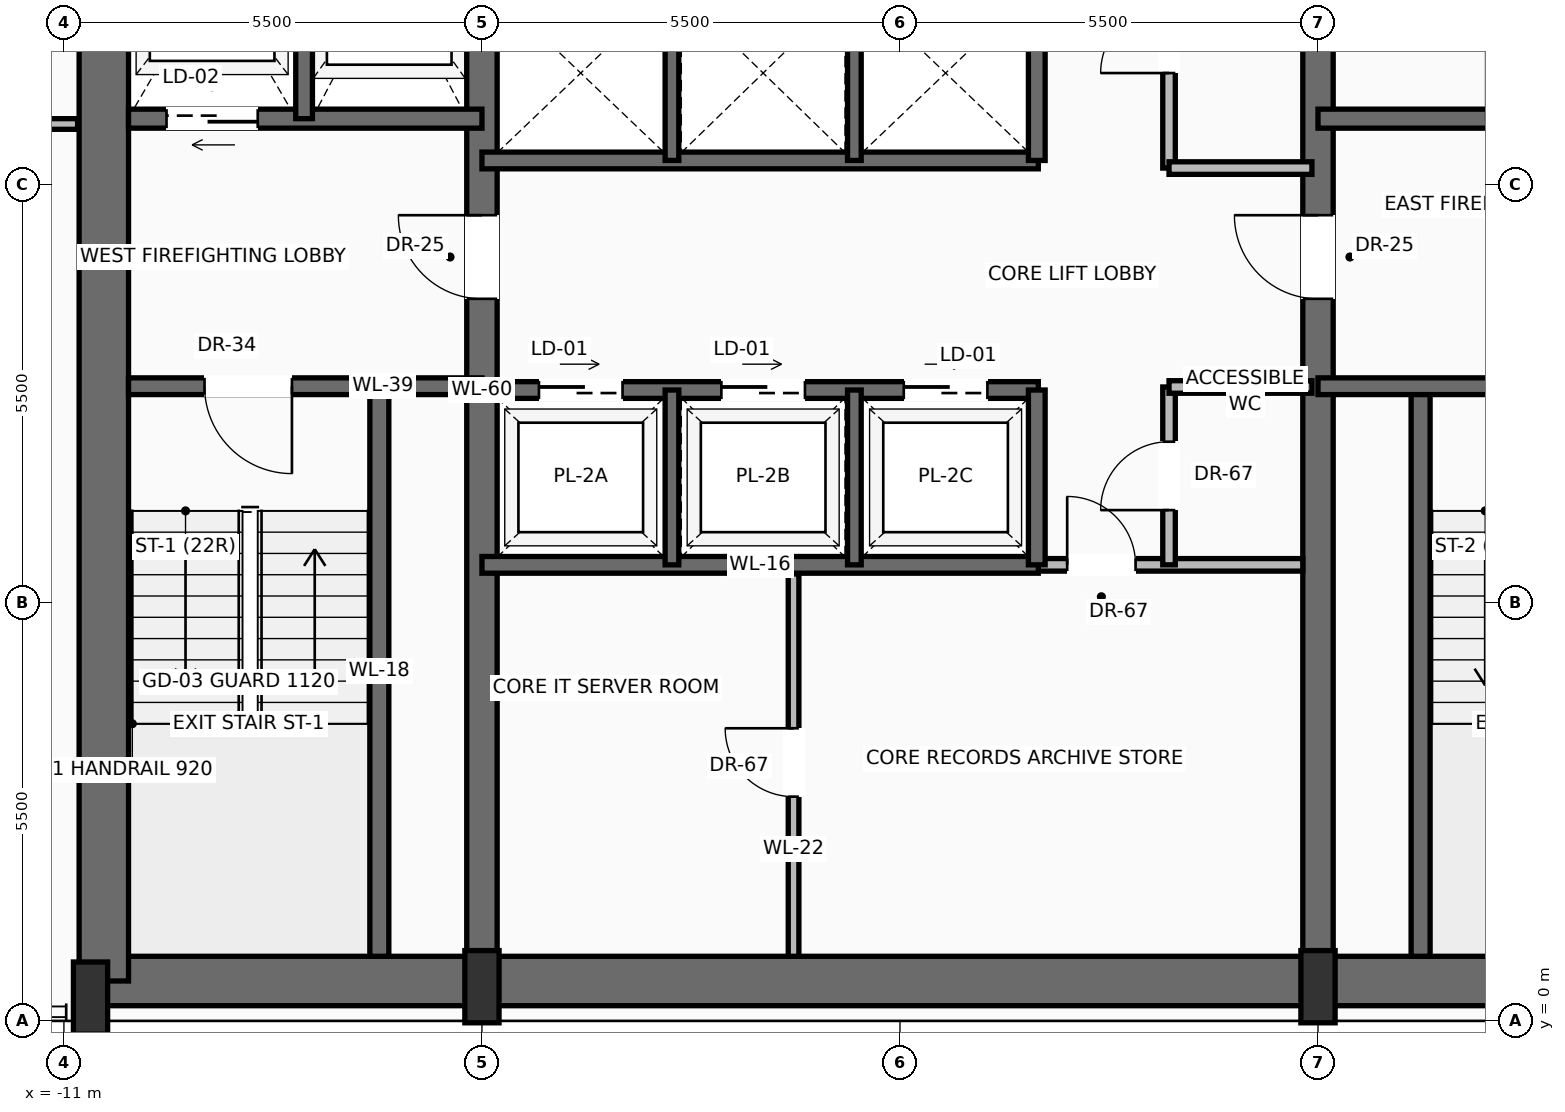
"""IFC4 building model, lengths in metres.
Left out: names, types, materials, properties, quantities, classifications, styles, units other than length and angle.
Written with IfcOpenShell. Run it as: python <this file> out.ifc"""

import sys

from ifc_helpers import new_model, si_unit, direction, frame, frame_2d, origin, origin_2d, place, context, subcontext, project, spatial, rectangle, extrude, source, transform, mapped, element, fill, save


model = new_model("IFC4")
c1 = context("Model", 3, precision=1e-05, world=origin(), true_north=direction((0.0, 1.0)))
c2 = subcontext(c1, "Body", "Model", "MODEL_VIEW")
j1 = project(units=[si_unit("LENGTHUNIT", "METRE"), si_unit("PLANEANGLEUNIT", "RADIAN")], contexts=[c1])
p1 = place(None, origin())
s1 = spatial("IfcSite", under=j1, at=p1, CompositionType="ELEMENT")
p2 = place(p1, origin())
s2 = spatial("IfcBuilding", under=s1, at=p2, CompositionType="ELEMENT")
p3 = place(p2, frame((0.0, 0.0, 136.7)))
s3 = spatial("IfcBuildingStorey", under=s2, at=p3, CompositionType="ELEMENT", Elevation=136.7)
p4 = place(p3, frame((-10.65, 0.525, 0.0), z_axis=(0.0, 0.0, 1.0), x_axis=(1.0, 0.0, 0.0)))
e1 = element("IfcWall", 1, at=p4, inside=s3, PredefinedType="SHEAR", context=c2, shape_type="SweptSolid", body=[
    extrude(rectangle(XDim=21.3, YDim=0.65, at=frame_2d((10.65, 0.0))), origin(), (0.0, 0.0, 1.0), 3.47),
])
p5 = place(p3, frame((-10.475, 0.525, 0.0), z_axis=(0.0, 0.0, 1.0), x_axis=(0.0, 1.0, 0.0)))
e2 = element("IfcWall", 2, at=p5, inside=s3, PredefinedType="SHEAR", context=c2, shape_type="SweptSolid", body=[
    extrude(rectangle(XDim=15.55, YDim=0.65, at=frame_2d((7.775, 0.0))), origin(), (0.0, 0.0, 1.0), 3.47),
])
p6 = place(p3, frame((-5.5, 0.525, 0.0), z_axis=(0.0, 0.0, 1.0), x_axis=(0.0, 1.0, 0.0)))
e3 = element("IfcWall", 3, at=p6, inside=s3, PredefinedType="SHEAR", context=c2, shape_type="SweptSolid", body=[
    extrude(rectangle(XDim=15.55, YDim=0.4, at=frame_2d((7.775, 0.0))), origin(), (0.0, 0.0, 1.0), 3.47),
])
p7 = place(p6, frame((8.975, 0.0, 0.0)))
e4 = element("IfcOpeningElement", 4, at=p7, cuts=e3, PredefinedType="OPENING", context=c2, shape_type="SweptSolid", body=[
    extrude(rectangle(XDim=1.1, YDim=2.2, at=frame_2d((0.55, 1.1))), frame((0.0, 0.21, 0.0), z_axis=(0.0, -1.0, 0.0), x_axis=(1.0, 0.0, 0.0)), (0.0, 0.0, 1.0), 0.42),
])
p8 = place(p3, frame((5.5, 0.525, 0.0), z_axis=(0.0, 0.0, 1.0), x_axis=(0.0, 1.0, 0.0)))
e5 = element("IfcWall", 5, at=p8, inside=s3, PredefinedType="SHEAR", context=c2, shape_type="SweptSolid", body=[
    extrude(rectangle(XDim=15.55, YDim=0.4, at=frame_2d((7.775, 0.0))), origin(), (0.0, 0.0, 1.0), 3.47),
])
p9 = place(p8, frame((8.975, 0.0, 0.0)))
e6 = element("IfcOpeningElement", 6, at=p9, cuts=e5, PredefinedType="OPENING", context=c2, shape_type="SweptSolid", body=[
    extrude(rectangle(XDim=1.1, YDim=2.2, at=frame_2d((0.55, 1.1))), frame((0.0, 0.21, 0.0), z_axis=(0.0, -1.0, 0.0), x_axis=(1.0, 0.0, 0.0)), (0.0, 0.0, 1.0), 0.42),
])
m1 = source(origin(), c2, "Body", "SweptSolid", [
    extrude(rectangle(XDim=0.45, YDim=0.95, at=origin_2d()), origin(), (0.0, 0.0, 1.0), 3.7),
])
for number, where, z_axis, x_axis in (
    (7, (-10.65, 0.3, 0.0), (0.0, 0.0, 1.0), (1.0, 0.0, 0.0)),
    (8, (-5.5, 0.45, 0.0), (0.0, 0.0, 1.0), (1.0, 0.0, 0.0)),
    (9, (5.5, 0.45, 0.0), (0.0, 0.0, 1.0), (1.0, 0.0, 0.0)),
):
    element("IfcColumn", number, at=place(p3, frame(where, z_axis=z_axis, x_axis=x_axis)), inside=s3, PredefinedType="PILASTER", context=c2, shape_type="MappedRepresentation", body=[
        mapped(m1, transform((0.0, 0.0, 0.0), scale=1.0)),
    ])
p10 = place(p3, frame((-6.85, 0.85, 0.0), z_axis=(0.0, 0.0, 1.0), x_axis=(0.0, 1.0, 0.0)))
e10 = element("IfcWall", 10, at=p10, inside=s3, PredefinedType="SOLIDWALL", context=c2, shape_type="SweptSolid", body=[
    extrude(rectangle(XDim=7.5, YDim=0.25, at=frame_2d((3.75, 0.0))), origin(), (0.0, 0.0, 1.0), 3.47),
])
p11 = place(p3, frame((-5.5, 8.35, 0.0), z_axis=(0.0, 0.0, 1.0), x_axis=(-1.0, 0.0, 0.0)))
e11 = element("IfcWall", 11, at=p11, inside=s3, PredefinedType="SOLIDWALL", context=c2, shape_type="SweptSolid", body=[
    extrude(rectangle(XDim=4.65, YDim=0.22, at=frame_2d((2.325, 0.0))), origin(), (0.0, 0.0, 1.0), 3.47),
])
p12 = place(p11, frame((2.5, 0.0, 0.0)))
e12 = element("IfcOpeningElement", 12, at=p12, cuts=e11, PredefinedType="OPENING", context=c2, shape_type="SweptSolid", body=[
    extrude(rectangle(XDim=1.15, YDim=2.2, at=frame_2d((0.575, 1.1))), frame((0.0, 0.12, 0.0), z_axis=(0.0, -1.0, 0.0), x_axis=(1.0, 0.0, 0.0)), (0.0, 0.0, 1.0), 0.24),
])
p13 = place(p3, frame((-5.5, 11.87, 0.0), z_axis=(0.0, 0.0, 1.0), x_axis=(-1.0, 0.0, 0.0)))
e13 = element("IfcWall", 13, at=p13, inside=s3, PredefinedType="SOLIDWALL", context=c2, shape_type="SweptSolid", body=[
    extrude(rectangle(XDim=4.65, YDim=0.25, at=frame_2d((2.325, 0.0))), origin(), (0.0, 0.0, 1.0), 3.47),
])
p14 = place(p13, frame((2.95, 0.0, 0.0)))
e14 = element("IfcOpeningElement", 14, at=p14, cuts=e13, PredefinedType="OPENING", context=c2, shape_type="SweptSolid", body=[
    extrude(rectangle(XDim=1.2, YDim=2.25, at=frame_2d((0.6, 1.125))), frame((0.0, 0.135, 0.0), z_axis=(0.0, -1.0, 0.0), x_axis=(1.0, 0.0, 0.0)), (0.0, 0.0, 1.0), 0.27),
])
p15 = place(p3, frame((-7.84, 11.87, 0.0), z_axis=(0.0, 0.0, 1.0), x_axis=(0.0, 1.0, 0.0)))
e15 = element("IfcWall", 15, at=p15, inside=s3, PredefinedType="SOLIDWALL", context=c2, shape_type="SweptSolid", body=[
    extrude(rectangle(XDim=3.88, YDim=0.22, at=frame_2d((1.94, 0.0))), origin(), (0.0, 0.0, 1.0), 3.47),
])
p16 = place(p3, frame((6.85, 0.85, 0.0), z_axis=(0.0, 0.0, 1.0), x_axis=(0.0, 1.0, 0.0)))
e16 = element("IfcWall", 16, at=p16, inside=s3, PredefinedType="SOLIDWALL", context=c2, shape_type="SweptSolid", body=[
    extrude(rectangle(XDim=7.5, YDim=0.25, at=frame_2d((3.75, 0.0))), origin(), (0.0, 0.0, 1.0), 3.47),
])
p17 = place(p3, frame((10.15, 8.35, 0.0), z_axis=(0.0, 0.0, 1.0), x_axis=(-1.0, 0.0, 0.0)))
e17 = element("IfcWall", 17, at=p17, inside=s3, PredefinedType="SOLIDWALL", context=c2, shape_type="SweptSolid", body=[
    extrude(rectangle(XDim=4.65, YDim=0.22, at=frame_2d((2.325, 0.0))), origin(), (0.0, 0.0, 1.0), 3.47),
])
p18 = place(p17, frame((1.0, 0.0, 0.0)))
e18 = element("IfcOpeningElement", 18, at=p18, cuts=e17, PredefinedType="OPENING", context=c2, shape_type="SweptSolid", body=[
    extrude(rectangle(XDim=1.15, YDim=2.2, at=frame_2d((0.575, 1.1))), frame((0.0, 0.12, 0.0), z_axis=(0.0, -1.0, 0.0), x_axis=(1.0, 0.0, 0.0)), (0.0, 0.0, 1.0), 0.24),
])
p19 = place(p3, frame((10.15, 11.87, 0.0), z_axis=(0.0, 0.0, 1.0), x_axis=(-1.0, 0.0, 0.0)))
e19 = element("IfcWall", 19, at=p19, inside=s3, PredefinedType="SOLIDWALL", context=c2, shape_type="SweptSolid", body=[
    extrude(rectangle(XDim=4.65, YDim=0.25, at=frame_2d((2.325, 0.0))), origin(), (0.0, 0.0, 1.0), 3.47),
])
p20 = place(p19, frame((0.5, 0.0, 0.0)))
e20 = element("IfcOpeningElement", 20, at=p20, cuts=e19, PredefinedType="OPENING", context=c2, shape_type="SweptSolid", body=[
    extrude(rectangle(XDim=1.2, YDim=2.25, at=frame_2d((0.6, 1.125))), frame((0.0, 0.135, 0.0), z_axis=(0.0, -1.0, 0.0), x_axis=(1.0, 0.0, 0.0)), (0.0, 0.0, 1.0), 0.27),
])
p21 = place(p3, frame((1.82, 6.0, 0.0), z_axis=(0.0, 0.0, 1.0), x_axis=(1.0, 0.0, 0.0)))
e21 = element("IfcWall", 21, at=p21, inside=s3, PredefinedType="PARTITIONING", context=c2, shape_type="SweptSolid", body=[
    extrude(rectangle(XDim=3.48, YDim=0.165, at=frame_2d((1.74, 0.0))), origin(), (0.0, 0.0, 1.0), 3.462),
])
p22 = place(p21, frame((0.38, 0.0, 0.0)))
e22 = element("IfcOpeningElement", 22, at=p22, cuts=e21, PredefinedType="OPENING", context=c2, shape_type="SweptSolid", body=[
    extrude(rectangle(XDim=0.9, YDim=2.1, at=frame_2d((0.45, 1.05))), frame((0.0, 0.093, 0.0), z_axis=(0.0, -1.0, 0.0), x_axis=(1.0, 0.0, 0.0)), (0.0, 0.0, 1.0), 0.185),
])
p23 = place(p3, frame((-1.4, 0.85, 0.0), z_axis=(0.0, 0.0, 1.0), x_axis=(0.0, 1.0, 0.0)))
e23 = element("IfcWall", 23, at=p23, inside=s3, PredefinedType="PARTITIONING", context=c2, shape_type="SweptSolid", body=[
    extrude(rectangle(XDim=5.03, YDim=0.14, at=frame_2d((2.515, 0.0))), origin(), (0.0, 0.0, 1.0), 3.462),
])
p24 = place(p23, frame((2.1, 0.0, 0.0)))
e24 = element("IfcOpeningElement", 24, at=p24, cuts=e23, PredefinedType="OPENING", context=c2, shape_type="SweptSolid", body=[
    extrude(rectangle(XDim=0.9, YDim=2.1, at=frame_2d((0.45, 1.05))), frame((0.0, 0.08, 0.0), z_axis=(0.0, -1.0, 0.0), x_axis=(1.0, 0.0, 0.0)), (0.0, 0.0, 1.0), 0.16),
])
p25 = place(p3, frame((3.54, 6.0, 0.0), z_axis=(0.0, 0.0, 1.0), x_axis=(0.0, 1.0, 0.0)))
e25 = element("IfcWall", 25, at=p25, inside=s3, PredefinedType="PARTITIONING", context=c2, shape_type="SweptSolid", body=[
    extrude(rectangle(XDim=2.34, YDim=0.165, at=frame_2d((1.17, 0.0))), origin(), (0.0, 0.0, 1.0), 3.462),
])
p26 = place(p25, frame((0.72, 0.0, 0.0)))
e26 = element("IfcOpeningElement", 26, at=p26, cuts=e25, PredefinedType="OPENING", context=c2, shape_type="SweptSolid", body=[
    extrude(rectangle(XDim=0.9, YDim=2.1, at=frame_2d((0.45, 1.05))), frame((0.0, 0.093, 0.0), z_axis=(0.0, -1.0, 0.0), x_axis=(1.0, 0.0, 0.0)), (0.0, 0.0, 1.0), 0.185),
])
p27 = place(p3, frame((3.54, 8.34, 0.0), z_axis=(0.0, 0.0, 1.0), x_axis=(1.0, 0.0, 0.0)))
e27 = element("IfcWall", 27, at=p27, inside=s3, PredefinedType="PARTITIONING", context=c2, shape_type="SweptSolid", body=[
    extrude(rectangle(XDim=1.88, YDim=0.165, at=frame_2d((0.94, 0.0))), origin(), (0.0, 0.0, 1.0), 3.462),
])
p28 = place(p3, frame((-5.5, 6.0, 0.0), z_axis=(0.0, 0.0, 1.0), x_axis=(1.0, 0.0, 0.0)))
e28 = element("IfcWall", 28, at=p28, inside=s3, PredefinedType="SOLIDWALL", context=c2, shape_type="SweptSolid", body=[
    extrude(rectangle(XDim=7.32, YDim=0.22, at=frame_2d((3.66, 0.0))), origin(), (0.0, 0.0, 1.0), 3.47),
])
p29 = place(p3, frame((-5.5, 8.3, 0.0), z_axis=(0.0, 0.0, 1.0), x_axis=(1.0, 0.0, 0.0)))
e29 = element("IfcWall", 29, at=p29, inside=s3, PredefinedType="SOLIDWALL", context=c2, shape_type="SweptSolid", body=[
    extrude(rectangle(XDim=7.32, YDim=0.22, at=frame_2d((3.66, 0.0))), origin(), (0.0, 0.0, 1.0), 3.47),
])
p30 = place(p29, frame((0.75, 0.0, 0.0)))
e30 = element("IfcOpeningElement", 30, at=p30, cuts=e29, PredefinedType="OPENING", context=c2, shape_type="SweptSolid", body=[
    extrude(rectangle(XDim=1.1, YDim=2.2, at=frame_2d((0.55, 1.1))), frame((0.0, 0.12, 0.0), z_axis=(0.0, -1.0, 0.0), x_axis=(1.0, 0.0, 0.0)), (0.0, 0.0, 1.0), 0.24),
])
p31 = place(p29, frame((3.15, 0.0, 0.0)))
e31 = element("IfcOpeningElement", 31, at=p31, cuts=e29, PredefinedType="OPENING", context=c2, shape_type="SweptSolid", body=[
    extrude(rectangle(XDim=1.1, YDim=2.2, at=frame_2d((0.55, 1.1))), frame((0.0, 0.12, 0.0), z_axis=(0.0, -1.0, 0.0), x_axis=(1.0, 0.0, 0.0)), (0.0, 0.0, 1.0), 0.24),
])
p32 = place(p29, frame((5.55, 0.0, 0.0)))
e32 = element("IfcOpeningElement", 32, at=p32, cuts=e29, PredefinedType="OPENING", context=c2, shape_type="SweptSolid", body=[
    extrude(rectangle(XDim=1.1, YDim=2.2, at=frame_2d((0.55, 1.1))), frame((0.0, 0.12, 0.0), z_axis=(0.0, -1.0, 0.0), x_axis=(1.0, 0.0, 0.0)), (0.0, 0.0, 1.0), 0.24),
])
p33 = place(p3, frame((1.8, 6.0, 0.0), z_axis=(0.0, 0.0, 1.0), x_axis=(0.0, 1.0, 0.0)))
e33 = element("IfcWall", 33, at=p33, inside=s3, PredefinedType="SOLIDWALL", context=c2, shape_type="SweptSolid", body=[
    extrude(rectangle(XDim=2.3, YDim=0.22, at=frame_2d((1.15, 0.0))), origin(), (0.0, 0.0, 1.0), 3.47),
])
for number, where, z_axis, x_axis in (
    (34, (-3.0, 6.0, 0.0), (0.0, 0.0, 1.0), (0.0, 1.0, 0.0)),
    (35, (-0.6, 6.0, 0.0), (0.0, 0.0, 1.0), (0.0, 1.0, 0.0)),
):
    element("IfcWall", number, at=place(p3, frame(where, z_axis=z_axis, x_axis=x_axis)), inside=s3, PredefinedType="SOLIDWALL", context=c2, shape_type="SweptSolid", body=[
        extrude(rectangle(XDim=2.3, YDim=0.18, at=frame_2d((1.15, 0.0))), origin(), (0.0, 0.0, 1.0), 3.47),
    ])
p34 = place(p3, frame((-5.5, 11.32, 0.0), z_axis=(0.0, 0.0, 1.0), x_axis=(1.0, 0.0, 0.0)))
e36 = element("IfcWall", 36, at=p34, inside=s3, PredefinedType="SOLIDWALL", context=c2, shape_type="SweptSolid", body=[
    extrude(rectangle(XDim=7.32, YDim=0.22, at=frame_2d((3.66, 0.0))), origin(), (0.0, 0.0, 1.0), 3.47),
])
p35 = place(p3, frame((1.8, 11.32, 0.0), z_axis=(0.0, 0.0, 1.0), x_axis=(0.0, 1.0, 0.0)))
e37 = element("IfcWall", 37, at=p35, inside=s3, PredefinedType="SOLIDWALL", context=c2, shape_type="SweptSolid", body=[
    extrude(rectangle(XDim=2.3, YDim=0.22, at=frame_2d((1.15, 0.0))), origin(), (0.0, 0.0, 1.0), 3.47),
])
for number, where, z_axis, x_axis in (
    (38, (-3.0, 11.32, 0.0), (0.0, 0.0, 1.0), (0.0, 1.0, 0.0)),
    (39, (-0.6, 11.32, 0.0), (0.0, 0.0, 1.0), (0.0, 1.0, 0.0)),
):
    element("IfcWall", number, at=place(p3, frame(where, z_axis=z_axis, x_axis=x_axis)), inside=s3, PredefinedType="SOLIDWALL", context=c2, shape_type="SweptSolid", body=[
        extrude(rectangle(XDim=2.3, YDim=0.18, at=frame_2d((1.15, 0.0))), origin(), (0.0, 0.0, 1.0), 3.47),
    ])
p36 = place(p3, frame((3.54, 11.22, 0.0), z_axis=(0.0, 0.0, 1.0), x_axis=(0.0, 1.0, 0.0)))
e40 = element("IfcWall", 40, at=p36, inside=s3, PredefinedType="PARTITIONING", context=c2, shape_type="SweptSolid", body=[
    extrude(rectangle(XDim=4.53, YDim=0.165, at=frame_2d((2.265, 0.0))), origin(), (0.0, 0.0, 1.0), 3.462),
])
p37 = place(p36, frame((1.25, 0.0, 0.0)))
e41 = element("IfcOpeningElement", 41, at=p37, cuts=e40, PredefinedType="OPENING", context=c2, shape_type="SweptSolid", body=[
    extrude(rectangle(XDim=0.9, YDim=2.1, at=frame_2d((0.45, 1.05))), frame((0.0, 0.093, 0.0), z_axis=(0.0, -1.0, 0.0), x_axis=(1.0, 0.0, 0.0)), (0.0, 0.0, 1.0), 0.185),
])
p38 = place(p3, frame((3.54, 11.22, 0.0), z_axis=(0.0, 0.0, 1.0), x_axis=(1.0, 0.0, 0.0)))
e42 = element("IfcWall", 42, at=p38, inside=s3, PredefinedType="PARTITIONING", context=c2, shape_type="SweptSolid", body=[
    extrude(rectangle(XDim=1.88, YDim=0.165, at=frame_2d((0.94, 0.0))), origin(), (0.0, 0.0, 1.0), 3.462),
])
p39 = place(p3, frame((-24.746, 11.8, 0.0), z_axis=(0.0, 0.0, 1.0), x_axis=(1.0, 0.0, 0.0)))
e43 = element("IfcWall", 43, at=p39, inside=s3, PredefinedType="PARTITIONING", context=c2, shape_type="SweptSolid", body=[
    extrude(rectangle(XDim=13.926, YDim=0.14, at=frame_2d((6.963, 0.0))), origin(), (0.0, 0.0, 1.0), 3.462),
])
p40 = place(p39, frame((6.498, 0.0, 0.0)))
e44 = element("IfcOpeningElement", 44, at=p40, cuts=e43, PredefinedType="OPENING", context=c2, shape_type="SweptSolid", body=[
    extrude(rectangle(XDim=0.95, YDim=2.2, at=frame_2d((0.475, 1.1))), frame((0.0, 0.08, 0.0), z_axis=(0.0, -1.0, 0.0), x_axis=(1.0, 0.0, 0.0)), (0.0, 0.0, 1.0), 0.16),
])
m2 = source(origin(), c2, "Body", "SweptSolid", [
    extrude(rectangle(XDim=1.15, YDim=2.2, at=frame_2d((0.575, 1.1))), frame((0.0, 0.025, 0.0), z_axis=(0.0, -1.0, 0.0), x_axis=(1.0, 0.0, 0.0)), (0.0, 0.0, 1.0), 0.05),
])
p41 = place(p12, origin())
e45 = element("IfcDoor", 45, at=p41, inside=s3, OperationType="SINGLE_SWING_LEFT", PredefinedType="DOOR", context=c2, shape_type="MappedRepresentation", body=[
    mapped(m2, transform((0.0, 0.0, 0.0), scale=1.0)),
])
fill(e12, e45)
m3 = source(origin(), c2, "Body", "SweptSolid", [
    extrude(rectangle(XDim=1.1, YDim=2.2, at=frame_2d((0.55, 1.1))), frame((0.0, 0.025, 0.0), z_axis=(0.0, -1.0, 0.0), x_axis=(1.0, 0.0, 0.0)), (0.0, 0.0, 1.0), 0.05),
])
p42 = place(p7, origin())
e46 = element("IfcDoor", 46, at=p42, inside=s3, OperationType="SINGLE_SWING_RIGHT", PredefinedType="DOOR", context=c2, shape_type="MappedRepresentation", body=[
    mapped(m3, transform((0.0, 0.0, 0.0), scale=1.0)),
])
fill(e4, e46)
m4 = source(origin(), c2, "Body", "SweptSolid", [
    extrude(rectangle(XDim=1.2, YDim=2.25, at=frame_2d((0.6, 1.125))), frame((0.0, 0.025, 0.0), z_axis=(0.0, -1.0, 0.0), x_axis=(1.0, 0.0, 0.0)), (0.0, 0.0, 1.0), 0.05),
])
p43 = place(p14, origin())
e47 = element("IfcDoor", 47, at=p43, inside=s3, OperationType="SLIDING_TO_LEFT", PredefinedType="DOOR", context=c2, shape_type="MappedRepresentation", body=[
    mapped(m4, transform((0.0, 0.0, 0.0), scale=1.0)),
])
fill(e14, e47)
p44 = place(p9, origin())
e48 = element("IfcDoor", 48, at=p44, inside=s3, OperationType="SINGLE_SWING_RIGHT", PredefinedType="DOOR", context=c2, shape_type="MappedRepresentation", body=[
    mapped(m3, transform((0.0, 0.0, 0.0), scale=1.0)),
])
fill(e6, e48)
m5 = source(origin(), c2, "Body", "SweptSolid", [
    extrude(rectangle(XDim=0.9, YDim=2.1, at=frame_2d((0.45, 1.05))), frame((0.0, 0.025, 0.0), z_axis=(0.0, -1.0, 0.0), x_axis=(1.0, 0.0, 0.0)), (0.0, 0.0, 1.0), 0.05),
])
p45 = place(p22, origin())
e49 = element("IfcDoor", 49, at=p45, inside=s3, OperationType="SINGLE_SWING_LEFT", PredefinedType="DOOR", context=c2, shape_type="MappedRepresentation", body=[
    mapped(m5, transform((0.0, 0.0, 0.0), scale=1.0)),
])
fill(e22, e49)
p46 = place(p24, origin())
e50 = element("IfcDoor", 50, at=p46, inside=s3, OperationType="SINGLE_SWING_RIGHT", PredefinedType="DOOR", context=c2, shape_type="MappedRepresentation", body=[
    mapped(m5, transform((0.0, 0.0, 0.0), scale=1.0)),
])
fill(e24, e50)
p47 = place(p26, origin())
e51 = element("IfcDoor", 51, at=p47, inside=s3, OperationType="SINGLE_SWING_LEFT", PredefinedType="DOOR", context=c2, shape_type="MappedRepresentation", body=[
    mapped(m5, transform((0.0, 0.0, 0.0), scale=1.0)),
])
fill(e26, e51)
m6 = source(origin(), c2, "Body", "SweptSolid", [
    extrude(rectangle(XDim=1.1, YDim=2.2, at=frame_2d((0.55, 1.1))), frame((0.0, 0.025, 0.0), z_axis=(0.0, -1.0, 0.0), x_axis=(1.0, 0.0, 0.0)), (0.0, 0.0, 1.0), 0.05),
])
p48 = place(p30, origin())
e52 = element("IfcDoor", 52, at=p48, inside=s3, OperationType="SLIDING_TO_LEFT", PredefinedType="DOOR", context=c2, shape_type="MappedRepresentation", body=[
    mapped(m6, transform((0.0, 0.0, 0.0), scale=1.0)),
])
fill(e30, e52)
p49 = place(p31, origin())
e53 = element("IfcDoor", 53, at=p49, inside=s3, OperationType="SLIDING_TO_LEFT", PredefinedType="DOOR", context=c2, shape_type="MappedRepresentation", body=[
    mapped(m6, transform((0.0, 0.0, 0.0), scale=1.0)),
])
fill(e31, e53)
p50 = place(p32, origin())
e54 = element("IfcDoor", 54, at=p50, inside=s3, OperationType="SLIDING_TO_LEFT", PredefinedType="DOOR", context=c2, shape_type="MappedRepresentation", body=[
    mapped(m6, transform((0.0, 0.0, 0.0), scale=1.0)),
])
fill(e32, e54)
p51 = place(p37, origin())
e55 = element("IfcDoor", 55, at=p51, inside=s3, OperationType="SINGLE_SWING_LEFT", PredefinedType="DOOR", context=c2, shape_type="MappedRepresentation", body=[
    mapped(m5, transform((0.0, 0.0, 0.0), scale=1.0)),
])
fill(e41, e55)
save(model, sys.argv[1])
